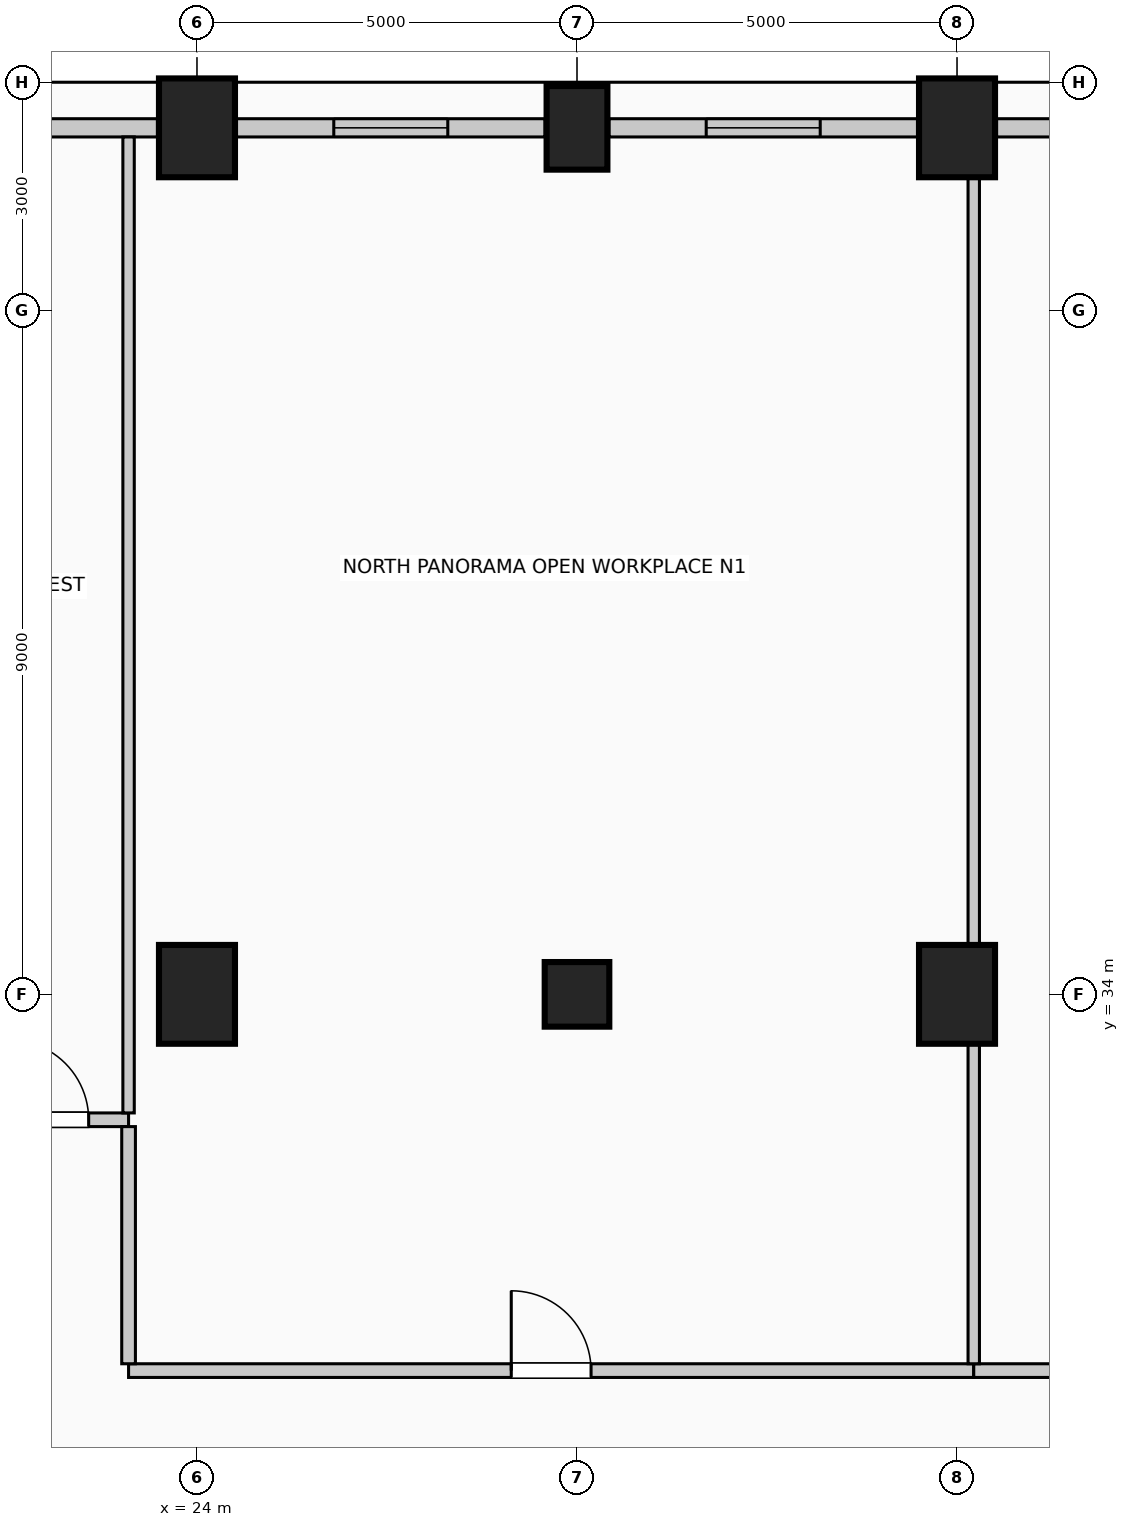
"""IFC4 building model, lengths in metres.
Left out: names, types, materials, properties, quantities, classifications, styles, units other than length and angle.
Written with IfcOpenShell. Run it as: python <this file> out.ifc"""

import sys

from ifc_helpers import new_model, si_unit, direction, frame, frame_2d, origin, origin_2d, place, context, subcontext, project, spatial, rectangle, circle, extrude, element, fill, save


model = new_model("IFC4")
c1 = context("Model", 3, precision=1e-05, world=origin(), true_north=direction((0.0, 1.0)))
c2 = subcontext(c1, "Body", "Model", "MODEL_VIEW")
j1 = project(units=[si_unit("LENGTHUNIT", "METRE"), si_unit("PLANEANGLEUNIT", "RADIAN")], contexts=[c1])
p1 = place(None, origin())
s1 = spatial("IfcSite", under=j1, at=p1, CompositionType="ELEMENT")
p2 = place(p1, origin())
s2 = spatial("IfcBuilding", under=s1, at=p2, CompositionType="ELEMENT")
p3 = place(p2, frame((0.0, 0.0, 210.6)))
s3 = spatial("IfcBuildingStorey", under=s2, at=p3, CompositionType="ELEMENT", Elevation=210.6)
p4 = place(p3, frame((24.0, 45.4, 0.0), z_axis=(0.0, 0.0, 1.0), x_axis=(1.0, 0.0, 0.0)))
e1 = element("IfcColumn", 1, at=p4, inside=s3, PredefinedType="COLUMN", context=c2, shape_type="SweptSolid", body=[
    extrude(rectangle(XDim=1.0, YDim=1.3, at=origin_2d()), origin(), (0.0, 0.0, 1.0), 4.0),
])
p5 = place(p3, frame((29.0, 45.4, 0.0), z_axis=(0.0, 0.0, 1.0), x_axis=(1.0, 0.0, 0.0)))
e2 = element("IfcColumn", 2, at=p5, inside=s3, PredefinedType="COLUMN", context=c2, shape_type="SweptSolid", body=[
    extrude(rectangle(XDim=0.8, YDim=1.1, at=origin_2d()), origin(), (0.0, 0.0, 1.0), 4.0),
])
for number, where, z_axis, x_axis in (
    (3, (34.0, 45.4, 0.0), (0.0, 0.0, 1.0), (1.0, 0.0, 0.0)),
    (4, (24.0, 34.0, 0.0), (0.0, 0.0, 1.0), (1.0, 0.0, 0.0)),
    (5, (34.0, 34.0, 0.0), (0.0, 0.0, 1.0), (1.0, 0.0, 0.0)),
):
    element("IfcColumn", number, at=place(p3, frame(where, z_axis=z_axis, x_axis=x_axis)), inside=s3, PredefinedType="COLUMN", context=c2, shape_type="SweptSolid", body=[
        extrude(rectangle(XDim=1.0, YDim=1.3, at=origin_2d()), origin(), (0.0, 0.0, 1.0), 4.0),
    ])
p6 = place(p3, frame((29.0, 34.0, 0.0), z_axis=(0.0, 0.0, 1.0), x_axis=(1.0, 0.0, 0.0)))
e6 = element("IfcColumn", 6, at=p6, inside=s3, PredefinedType="COLUMN", context=c2, shape_type="SweptSolid", body=[
    extrude(circle(Radius=0.425, at=origin_2d()), origin(), (0.0, 0.0, 1.0), 4.0),
])
p7 = place(p3, frame((16.92, 45.4, 0.0), z_axis=(0.0, 0.0, 1.0), x_axis=(1.0, 0.0, 0.0)))
e7 = element("IfcWall", 7, at=p7, inside=s3, PredefinedType="SOLIDWALL", context=c2, shape_type="SweptSolid", body=[
    extrude(rectangle(XDim=6.56, YDim=0.24, at=frame_2d((3.28, 0.0))), origin(), (0.0, 0.0, 1.0), 3.0),
])
p8 = place(p7, frame((1.187, 0.0, 0.42)))
e8 = element("IfcOpeningElement", 8, at=p8, cuts=e7, PredefinedType="OPENING", context=c2, shape_type="SweptSolid", body=[
    extrude(rectangle(XDim=1.5, YDim=2.2, at=frame_2d((0.75, 1.1))), frame((0.0, 0.13, 0.0), z_axis=(0.0, -1.0, 0.0), x_axis=(1.0, 0.0, 0.0)), (0.0, 0.0, 1.0), 0.26),
])
p9 = place(p3, frame((24.52, 45.4, 0.0), z_axis=(0.0, 0.0, 1.0), x_axis=(1.0, 0.0, 0.0)))
e9 = element("IfcWall", 9, at=p9, inside=s3, PredefinedType="SOLIDWALL", context=c2, shape_type="SweptSolid", body=[
    extrude(rectangle(XDim=4.06, YDim=0.24, at=frame_2d((2.03, 0.0))), origin(), (0.0, 0.0, 1.0), 3.0),
])
p10 = place(p9, frame((1.28, 0.0, 0.42)))
e10 = element("IfcOpeningElement", 10, at=p10, cuts=e9, PredefinedType="OPENING", context=c2, shape_type="SweptSolid", body=[
    extrude(rectangle(XDim=1.5, YDim=2.2, at=frame_2d((0.75, 1.1))), frame((0.0, 0.13, 0.0), z_axis=(0.0, -1.0, 0.0), x_axis=(1.0, 0.0, 0.0)), (0.0, 0.0, 1.0), 0.26),
])
p11 = place(p3, frame((29.42, 45.4, 0.0), z_axis=(0.0, 0.0, 1.0), x_axis=(1.0, 0.0, 0.0)))
e11 = element("IfcWall", 11, at=p11, inside=s3, PredefinedType="SOLIDWALL", context=c2, shape_type="SweptSolid", body=[
    extrude(rectangle(XDim=4.06, YDim=0.24, at=frame_2d((2.03, 0.0))), origin(), (0.0, 0.0, 1.0), 3.0),
])
p12 = place(p11, frame((1.28, 0.0, 0.42)))
e12 = element("IfcOpeningElement", 12, at=p12, cuts=e11, PredefinedType="OPENING", context=c2, shape_type="SweptSolid", body=[
    extrude(rectangle(XDim=1.5, YDim=2.2, at=frame_2d((0.75, 1.1))), frame((0.0, 0.13, 0.0), z_axis=(0.0, -1.0, 0.0), x_axis=(1.0, 0.0, 0.0)), (0.0, 0.0, 1.0), 0.26),
])
p13 = place(p3, frame((34.52, 45.4, 0.0), z_axis=(0.0, 0.0, 1.0), x_axis=(1.0, 0.0, 0.0)))
e13 = element("IfcWall", 13, at=p13, inside=s3, PredefinedType="SOLIDWALL", context=c2, shape_type="SweptSolid", body=[
    extrude(rectangle(XDim=6.56, YDim=0.24, at=frame_2d((3.28, 0.0))), origin(), (0.0, 0.0, 1.0), 3.0),
])
p14 = place(p13, frame((3.873, 0.0, 0.42)))
e14 = element("IfcOpeningElement", 14, at=p14, cuts=e13, PredefinedType="OPENING", context=c2, shape_type="SweptSolid", body=[
    extrude(rectangle(XDim=1.5, YDim=2.2, at=frame_2d((0.75, 1.1))), frame((0.0, 0.13, 0.0), z_axis=(0.0, -1.0, 0.0), x_axis=(1.0, 0.0, 0.0)), (0.0, 0.0, 1.0), 0.26),
])
p15 = place(p3, frame((23.1, 29.05, 0.0), z_axis=(0.0, 0.0, 1.0), x_axis=(1.0, 0.0, 0.0)))
e15 = element("IfcWall", 15, at=p15, inside=s3, PredefinedType="PARTITIONING", context=c2, shape_type="SweptSolid", body=[
    extrude(rectangle(XDim=11.12, YDim=0.18, at=frame_2d((5.56, 0.0))), origin(), (0.0, 0.0, 1.0), 3.75),
])
p16 = place(p15, frame((5.035, 0.0, 0.0)))
e16 = element("IfcOpeningElement", 16, at=p16, cuts=e15, PredefinedType="OPENING", context=c2, shape_type="SweptSolid", body=[
    extrude(rectangle(XDim=1.05, YDim=2.15, at=frame_2d((0.525, 1.075))), frame((0.0, 0.1, 0.0), z_axis=(0.0, -1.0, 0.0), x_axis=(1.0, 0.0, 0.0)), (0.0, 0.0, 1.0), 0.2),
])
p17 = place(p3, frame((34.22, 29.05, 0.0), z_axis=(0.0, 0.0, 1.0), x_axis=(1.0, 0.0, 0.0)))
e17 = element("IfcWall", 17, at=p17, inside=s3, PredefinedType="PARTITIONING", context=c2, shape_type="SweptSolid", body=[
    extrude(rectangle(XDim=7.33, YDim=0.18, at=frame_2d((3.665, 0.0))), origin(), (0.0, 0.0, 1.0), 3.75),
])
p18 = place(p17, frame((3.19, 0.0, 0.0)))
e18 = element("IfcOpeningElement", 18, at=p18, cuts=e17, PredefinedType="OPENING", context=c2, shape_type="SweptSolid", body=[
    extrude(rectangle(XDim=0.95, YDim=2.15, at=frame_2d((0.475, 1.075))), frame((0.0, 0.1, 0.0), z_axis=(0.0, -1.0, 0.0), x_axis=(1.0, 0.0, 0.0)), (0.0, 0.0, 1.0), 0.2),
])
p19 = place(p3, frame((21.0, 32.35, 0.0), z_axis=(0.0, 0.0, 1.0), x_axis=(1.0, 0.0, 0.0)))
e19 = element("IfcWall", 19, at=p19, inside=s3, PredefinedType="PARTITIONING", context=c2, shape_type="SweptSolid", body=[
    extrude(rectangle(XDim=2.1, YDim=0.18, at=frame_2d((1.05, 0.0))), origin(), (0.0, 0.0, 1.0), 3.75),
])
p20 = place(p19, frame((0.525, 0.0, 0.0)))
e20 = element("IfcOpeningElement", 20, at=p20, cuts=e19, PredefinedType="OPENING", context=c2, shape_type="SweptSolid", body=[
    extrude(rectangle(XDim=1.05, YDim=2.15, at=frame_2d((0.525, 1.075))), frame((0.0, 0.1, 0.0), z_axis=(0.0, -1.0, 0.0), x_axis=(1.0, 0.0, 0.0)), (0.0, 0.0, 1.0), 0.2),
])
p21 = place(p3, frame((23.1, 29.14, 0.0), z_axis=(0.0, 0.0, 1.0), x_axis=(0.0, 1.0, 0.0)))
e21 = element("IfcWall", 21, at=p21, inside=s3, PredefinedType="PARTITIONING", context=c2, shape_type="SweptSolid", body=[
    extrude(rectangle(XDim=3.12, YDim=0.18, at=frame_2d((1.56, 0.0))), origin(), (0.0, 0.0, 1.0), 3.75),
])
p22 = place(p3, frame((23.1, 32.44, 0.0), z_axis=(0.0, 0.0, 1.0), x_axis=(0.0, 1.0, 0.0)))
e22 = element("IfcWall", 22, at=p22, inside=s3, PredefinedType="PARTITIONING", context=c2, shape_type="SweptSolid", body=[
    extrude(rectangle(XDim=12.84, YDim=0.15, at=frame_2d((6.42, 0.0))), origin(), (0.0, 0.0, 1.0), 3.75),
])
p23 = place(p3, frame((34.22, 29.14, 0.0), z_axis=(0.0, 0.0, 1.0), x_axis=(0.0, 1.0, 0.0)))
e23 = element("IfcWall", 23, at=p23, inside=s3, PredefinedType="PARTITIONING", context=c2, shape_type="SweptSolid", body=[
    extrude(rectangle(XDim=4.21, YDim=0.15, at=frame_2d((2.105, 0.0))), origin(), (0.0, 0.0, 1.0), 3.145),
])
p24 = place(p3, frame((34.22, 34.65, 0.0), z_axis=(0.0, 0.0, 1.0), x_axis=(0.0, 1.0, 0.0)))
e24 = element("IfcWall", 24, at=p24, inside=s3, PredefinedType="PARTITIONING", context=c2, shape_type="SweptSolid", body=[
    extrude(rectangle(XDim=10.1, YDim=0.15, at=frame_2d((5.05, 0.0))), origin(), (0.0, 0.0, 1.0), 3.145),
])
p25 = place(p10, origin())
e25 = element("IfcWindow", 25, at=p25, inside=s3, PartitioningType="SINGLE_PANEL", PredefinedType="WINDOW", context=c2, shape_type="SweptSolid", body=[
    extrude(rectangle(XDim=1.5, YDim=2.2, at=frame_2d((0.75, 1.1))), frame((0.0, 0.03, 0.0), z_axis=(0.0, -1.0, 0.0), x_axis=(1.0, 0.0, 0.0)), (0.0, 0.0, 1.0), 0.06),
])
fill(e10, e25)
p26 = place(p12, origin())
e26 = element("IfcWindow", 26, at=p26, inside=s3, PartitioningType="SINGLE_PANEL", PredefinedType="WINDOW", context=c2, shape_type="SweptSolid", body=[
    extrude(rectangle(XDim=1.5, YDim=2.2, at=frame_2d((0.75, 1.1))), frame((0.0, 0.03, 0.0), z_axis=(0.0, -1.0, 0.0), x_axis=(1.0, 0.0, 0.0)), (0.0, 0.0, 1.0), 0.06),
])
fill(e12, e26)
p27 = place(p16, origin())
e27 = element("IfcDoor", 27, at=p27, inside=s3, OperationType="SINGLE_SWING_LEFT", PredefinedType="DOOR", context=c2, shape_type="SweptSolid", body=[
    extrude(rectangle(XDim=1.05, YDim=2.15, at=frame_2d((0.525, 1.075))), frame((0.0, 0.025, 0.0), z_axis=(0.0, -1.0, 0.0), x_axis=(1.0, 0.0, 0.0)), (0.0, 0.0, 1.0), 0.05),
])
fill(e16, e27)
p28 = place(p20, origin())
e28 = element("IfcDoor", 28, at=p28, inside=s3, OperationType="SINGLE_SWING_LEFT", PredefinedType="DOOR", context=c2, shape_type="SweptSolid", body=[
    extrude(rectangle(XDim=1.05, YDim=2.15, at=frame_2d((0.525, 1.075))), frame((0.0, 0.025, 0.0), z_axis=(0.0, -1.0, 0.0), x_axis=(1.0, 0.0, 0.0)), (0.0, 0.0, 1.0), 0.05),
])
fill(e20, e28)
save(model, sys.argv[1])
